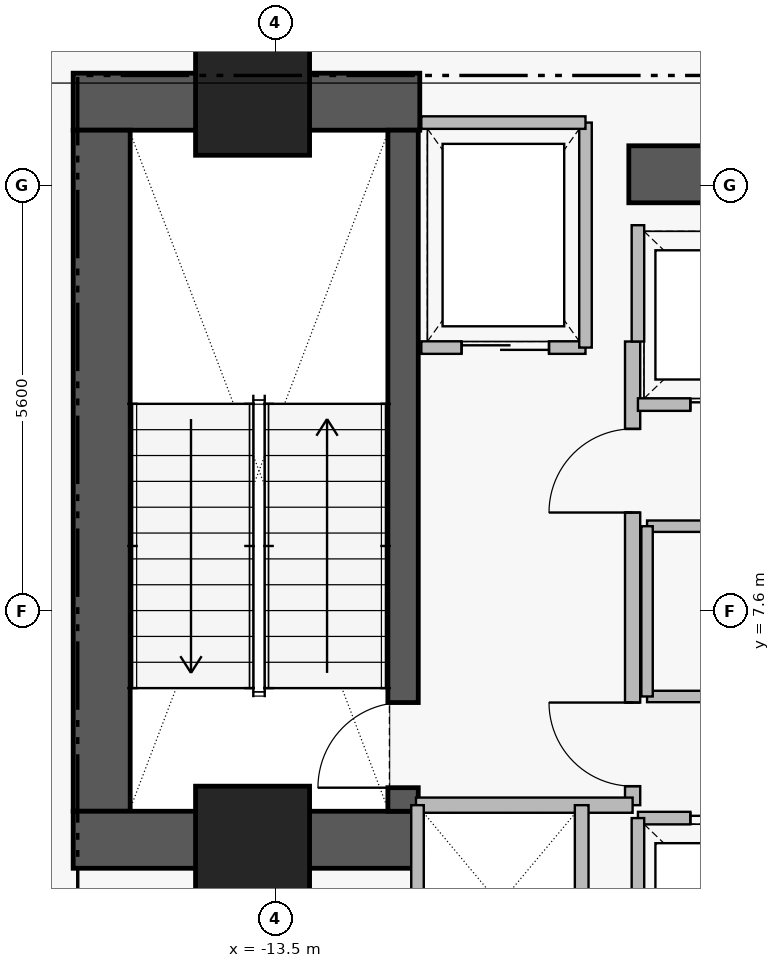
"""IFC4 building model, lengths in metres.
Left out: names, types, materials, properties, quantities, classifications, styles, units other than length and angle.
Written with IfcOpenShell. Run it as: python <this file> out.ifc"""

import sys

from ifc_helpers import new_model, si_unit, direction, frame, frame_2d, origin, origin_2d, place, context, subcontext, project, spatial, rectangle, extrude, element, fill, save


model = new_model("IFC4")
c1 = context("Model", 3, precision=1e-05, world=origin(), true_north=direction((0.0, 1.0)))
c2 = subcontext(c1, "Body", "Model", "MODEL_VIEW")
j1 = project(units=[si_unit("LENGTHUNIT", "METRE"), si_unit("PLANEANGLEUNIT", "RADIAN")], contexts=[c1])
p1 = place(None, origin())
s1 = spatial("IfcSite", under=j1, at=p1, CompositionType="ELEMENT")
p2 = place(p1, origin())
s2 = spatial("IfcBuilding", under=s1, at=p2, CompositionType="ELEMENT")
p3 = place(p2, frame((0.0, 0.0, 154.05)))
s3 = spatial("IfcBuildingStorey", under=s2, at=p3, CompositionType="ELEMENT", Elevation=154.05)
p4 = place(p3, frame((-16.16, 14.305, 0.0), z_axis=(0.0, 0.0, 1.0), x_axis=(1.0, 0.0, 0.0)))
e1 = element("IfcWall", 1, at=p4, inside=s3, PredefinedType="SHEAR", context=c2, shape_type="SweptSolid", body=[
    extrude(rectangle(XDim=4.56, YDim=0.75, at=frame_2d((2.28, 0.0))), origin(), (0.0, 0.0, 1.0), 4.31),
])
p5 = place(p3, frame((-15.785, 4.97, 0.0), z_axis=(0.0, 0.0, 1.0), x_axis=(0.0, 1.0, 0.0)))
e2 = element("IfcWall", 2, at=p5, inside=s3, PredefinedType="SHEAR", context=c2, shape_type="SweptSolid", body=[
    extrude(rectangle(XDim=8.96, YDim=0.75, at=frame_2d((4.48, 0.0))), origin(), (0.0, 0.0, 1.0), 4.31),
])
p6 = place(p3, frame((-16.16, 4.595, 0.0), z_axis=(0.0, 0.0, 1.0), x_axis=(1.0, 0.0, 0.0)))
e3 = element("IfcWall", 3, at=p6, inside=s3, PredefinedType="SHEAR", context=c2, shape_type="SweptSolid", body=[
    extrude(rectangle(XDim=4.56, YDim=0.75, at=frame_2d((2.28, 0.0))), origin(), (0.0, 0.0, 1.0), 4.31),
])
p7 = place(p3, frame((-8.85, 13.35, 0.0), z_axis=(0.0, 0.0, 1.0), x_axis=(1.0, 0.0, 0.0)))
e4 = element("IfcWall", 4, at=p7, inside=s3, PredefinedType="SHEAR", context=c2, shape_type="SweptSolid", body=[
    extrude(rectangle(XDim=7.6, YDim=0.75, at=frame_2d((3.8, 0.0))), origin(), (0.0, 0.0, 1.0), 4.28),
])
p8 = place(p3, frame((-11.82, 4.97, 0.0), z_axis=(0.0, 0.0, 1.0), x_axis=(0.0, 1.0, 0.0)))
e5 = element("IfcWall", 5, at=p8, inside=s3, PredefinedType="SHEAR", context=c2, shape_type="SweptSolid", body=[
    extrude(rectangle(XDim=8.96, YDim=0.4, at=frame_2d((4.48, 0.0))), origin(), (0.0, 0.0, 1.0), 4.31),
])
p9 = place(p8, frame((0.31, 0.0, 0.0)))
e6 = element("IfcOpeningElement", 6, at=p9, cuts=e5, PredefinedType="OPENING", context=c2, shape_type="SweptSolid", body=[
    extrude(rectangle(XDim=1.12, YDim=2.22, at=frame_2d((0.56, 1.11))), frame((0.0, 0.21, 0.0), z_axis=(0.0, -1.0, 0.0), x_axis=(1.0, 0.0, 0.0)), (0.0, 0.0, 1.0), 0.42),
])
for number, where, z_axis, x_axis in (
    (7, (-13.8, 14.35, 0.0), (0.0, 0.0, 1.0), (1.0, 0.0, 0.0)),
    (8, (-13.8, 4.55, 0.0), (0.0, 0.0, 1.0), (1.0, 0.0, 0.0)),
):
    element("IfcColumn", number, at=place(p3, frame(where, z_axis=z_axis, x_axis=x_axis)), inside=s3, PredefinedType="COLUMN", context=c2, shape_type="SweptSolid", body=[
        extrude(rectangle(XDim=1.5, YDim=1.5, at=origin_2d()), origin(), (0.0, 0.0, 1.0), 4.5),
    ])
p10 = place(p3, frame((-8.8, 5.05, 0.0), z_axis=(0.0, 0.0, 1.0), x_axis=(0.0, 1.0, 0.0)))
e9 = element("IfcWall", 9, at=p10, inside=s3, PredefinedType="PARTITIONING", context=c2, shape_type="SweptSolid", body=[
    extrude(rectangle(XDim=6.1, YDim=0.2, at=frame_2d((3.05, 0.0))), origin(), (0.0, 0.0, 1.0), 4.28),
])
p11 = place(p10, frame((0.25, 0.0, 0.0)))
e10 = element("IfcOpeningElement", 10, at=p11, cuts=e9, PredefinedType="OPENING", context=c2, shape_type="SweptSolid", body=[
    extrude(rectangle(XDim=1.1, YDim=2.2, at=frame_2d((0.55, 1.1))), frame((0.0, 0.11, 0.0), z_axis=(0.0, -1.0, 0.0), x_axis=(1.0, 0.0, 0.0)), (0.0, 0.0, 1.0), 0.22),
])
p12 = place(p10, frame((3.85, 0.0, 0.0)))
e11 = element("IfcOpeningElement", 11, at=p12, cuts=e9, PredefinedType="OPENING", context=c2, shape_type="SweptSolid", body=[
    extrude(rectangle(XDim=1.1, YDim=2.2, at=frame_2d((0.55, 1.1))), frame((0.0, 0.11, 0.0), z_axis=(0.0, -1.0, 0.0), x_axis=(1.0, 0.0, 0.0)), (0.0, 0.0, 1.0), 0.22),
])
p13 = place(p3, frame((-11.58, 11.07, 0.0), z_axis=(0.0, 0.0, 1.0), x_axis=(1.0, 0.0, 0.0)))
e12 = element("IfcWall", 12, at=p13, inside=s3, PredefinedType="PARTITIONING", context=c2, shape_type="SweptSolid", body=[
    extrude(rectangle(XDim=2.16, YDim=0.165, at=frame_2d((1.08, 0.0))), origin(), (0.0, 0.0, 1.0), 4.28),
])
p14 = place(p13, frame((0.53, 0.0, 0.0)))
e13 = element("IfcOpeningElement", 13, at=p14, cuts=e12, PredefinedType="OPENING", context=c2, shape_type="SweptSolid", body=[
    extrude(rectangle(XDim=1.15, YDim=2.25, at=frame_2d((0.575, 1.125))), frame((0.0, 0.093, 0.0), z_axis=(0.0, -1.0, 0.0), x_axis=(1.0, 0.0, 0.0)), (0.0, 0.0, 1.0), 0.185),
])
p15 = place(p3, frame((-8.73, 4.88, 0.0), z_axis=(0.0, 0.0, 1.0), x_axis=(1.0, 0.0, 0.0)))
e14 = element("IfcWall", 14, at=p15, inside=s3, PredefinedType="PARTITIONING", context=c2, shape_type="SweptSolid", body=[
    extrude(rectangle(XDim=2.48, YDim=0.165, at=frame_2d((1.24, 0.0))), origin(), (0.0, 0.0, 1.0), 4.28),
])
p16 = place(p15, frame((0.69, 0.0, 0.0)))
e15 = element("IfcOpeningElement", 15, at=p16, cuts=e14, PredefinedType="OPENING", context=c2, shape_type="SweptSolid", body=[
    extrude(rectangle(XDim=1.1, YDim=2.25, at=frame_2d((0.55, 1.125))), frame((0.0, 0.093, 0.0), z_axis=(0.0, -1.0, 0.0), x_axis=(1.0, 0.0, 0.0)), (0.0, 0.0, 1.0), 0.185),
])
p17 = place(p3, frame((-8.73, 10.32, 0.0), z_axis=(0.0, 0.0, 1.0), x_axis=(1.0, 0.0, 0.0)))
e16 = element("IfcWall", 16, at=p17, inside=s3, PredefinedType="PARTITIONING", context=c2, shape_type="SweptSolid", body=[
    extrude(rectangle(XDim=2.48, YDim=0.165, at=frame_2d((1.24, 0.0))), origin(), (0.0, 0.0, 1.0), 4.28),
])
p18 = place(p17, frame((0.69, 0.0, 0.0)))
e17 = element("IfcOpeningElement", 17, at=p18, cuts=e16, PredefinedType="OPENING", context=c2, shape_type="SweptSolid", body=[
    extrude(rectangle(XDim=1.1, YDim=2.25, at=frame_2d((0.55, 1.125))), frame((0.0, 0.093, 0.0), z_axis=(0.0, -1.0, 0.0), x_axis=(1.0, 0.0, 0.0)), (0.0, 0.0, 1.0), 0.185),
])
p19 = place(p3, frame((-8.61, 6.48, 0.0), z_axis=(0.0, 0.0, 1.0), x_axis=(1.0, 0.0, 0.0)))
e18 = element("IfcWall", 18, at=p19, inside=s3, PredefinedType="PARTITIONING", context=c2, shape_type="SweptSolid", body=[
    extrude(rectangle(XDim=3.62, YDim=0.15, at=frame_2d((1.81, 0.0))), origin(), (0.0, 0.0, 1.0), 4.28),
])
p20 = place(p19, frame((1.36, 0.0, 0.0)))
e19 = element("IfcOpeningElement", 19, at=p20, cuts=e18, PredefinedType="OPENING", context=c2, shape_type="SweptSolid", body=[
    extrude(rectangle(XDim=0.9, YDim=2.15, at=frame_2d((0.45, 1.075))), frame((0.0, 0.085, 0.0), z_axis=(0.0, -1.0, 0.0), x_axis=(1.0, 0.0, 0.0)), (0.0, 0.0, 1.0), 0.17),
])
p21 = place(p3, frame((-11.65, 5.05, 0.0), z_axis=(0.0, 0.0, 1.0), x_axis=(1.0, 0.0, 0.0)))
e20 = element("IfcWall", 20, at=p21, inside=s3, PredefinedType="PARTITIONING", context=c2, shape_type="SweptSolid", body=[
    extrude(rectangle(XDim=2.85, YDim=0.2, at=frame_2d((1.425, 0.0))), origin(), (0.0, 0.0, 1.0), 4.28),
])
p22 = place(p3, frame((-9.42, 11.07, 0.0), z_axis=(0.0, 0.0, 1.0), x_axis=(0.0, 1.0, 0.0)))
e21 = element("IfcWall", 21, at=p22, inside=s3, PredefinedType="PARTITIONING", context=c2, shape_type="SweptSolid", body=[
    extrude(rectangle(XDim=2.96, YDim=0.165, at=frame_2d((1.48, 0.0))), origin(), (0.0, 0.0, 1.0), 4.28),
])
p23 = place(p3, frame((-11.58, 14.03, 0.0), z_axis=(0.0, 0.0, 1.0), x_axis=(1.0, 0.0, 0.0)))
e22 = element("IfcWall", 22, at=p23, inside=s3, PredefinedType="PARTITIONING", context=c2, shape_type="SweptSolid", body=[
    extrude(rectangle(XDim=2.16, YDim=0.165, at=frame_2d((1.08, 0.0))), origin(), (0.0, 0.0, 1.0), 4.28),
])
p24 = place(p3, frame((-8.73, 2.52, 0.0), z_axis=(0.0, 0.0, 1.0), x_axis=(0.0, 1.0, 0.0)))
e23 = element("IfcWall", 23, at=p24, inside=s3, PredefinedType="PARTITIONING", context=c2, shape_type="SweptSolid", body=[
    extrude(rectangle(XDim=2.36, YDim=0.165, at=frame_2d((1.18, 0.0))), origin(), (0.0, 0.0, 1.0), 4.28),
])
p25 = place(p3, frame((-8.73, 11.15, 0.0), z_axis=(0.0, 0.0, 1.0), x_axis=(0.0, 1.0, 0.0)))
e24 = element("IfcWall", 24, at=p25, inside=s3, PredefinedType="PARTITIONING", context=c2, shape_type="SweptSolid", body=[
    extrude(rectangle(XDim=1.53, YDim=0.165, at=frame_2d((0.765, 0.0))), origin(), (0.0, 0.0, 1.0), 4.28),
])
p26 = place(p3, frame((-9.47, 2.45, 0.0), z_axis=(0.0, 0.0, 1.0), x_axis=(0.0, 1.0, 0.0)))
e25 = element("IfcWall", 25, at=p26, inside=s3, PredefinedType="PARTITIONING", context=c2, shape_type="SweptSolid", body=[
    extrude(rectangle(XDim=2.6, YDim=0.18, at=frame_2d((1.3, 0.0))), origin(), (0.0, 0.0, 1.0), 4.28),
])
p27 = place(p3, frame((-11.63, 2.47, 0.0), z_axis=(0.0, 0.0, 1.0), x_axis=(0.0, 1.0, 0.0)))
e26 = element("IfcWall", 26, at=p27, inside=s3, PredefinedType="PARTITIONING", context=c2, shape_type="SweptSolid", body=[
    extrude(rectangle(XDim=2.58, YDim=0.165, at=frame_2d((1.29, 0.0))), origin(), (0.0, 0.0, 1.0), 4.28),
])
p28 = place(p3, frame((-8.61, 8.72, 0.0), z_axis=(0.0, 0.0, 1.0), x_axis=(1.0, 0.0, 0.0)))
e27 = element("IfcWall", 27, at=p28, inside=s3, PredefinedType="PARTITIONING", context=c2, shape_type="SweptSolid", body=[
    extrude(rectangle(XDim=3.62, YDim=0.15, at=frame_2d((1.81, 0.0))), origin(), (0.0, 0.0, 1.0), 4.28),
])
p29 = place(p3, frame((-8.61, 6.48, 0.0), z_axis=(0.0, 0.0, 1.0), x_axis=(0.0, 1.0, 0.0)))
e28 = element("IfcWall", 28, at=p29, inside=s3, PredefinedType="PARTITIONING", context=c2, shape_type="SweptSolid", body=[
    extrude(rectangle(XDim=2.24, YDim=0.15, at=frame_2d((1.12, 0.0))), origin(), (0.0, 0.0, 1.0), 4.28),
])
p30 = place(p9, origin())
e29 = element("IfcDoor", 29, at=p30, inside=s3, OperationType="SINGLE_SWING_LEFT", PredefinedType="DOOR", context=c2, shape_type="SweptSolid", body=[
    extrude(rectangle(XDim=1.12, YDim=2.22, at=frame_2d((0.56, 1.11))), frame((0.0, 0.025, 0.0), z_axis=(0.0, -1.0, 0.0), x_axis=(1.0, 0.0, 0.0)), (0.0, 0.0, 1.0), 0.05),
])
fill(e6, e29)
p31 = place(p11, origin())
e30 = element("IfcDoor", 30, at=p31, inside=s3, OperationType="SINGLE_SWING_RIGHT", PredefinedType="DOOR", context=c2, shape_type="SweptSolid", body=[
    extrude(rectangle(XDim=1.1, YDim=2.2, at=frame_2d((0.55, 1.1))), frame((0.0, 0.025, 0.0), z_axis=(0.0, -1.0, 0.0), x_axis=(1.0, 0.0, 0.0)), (0.0, 0.0, 1.0), 0.05),
])
fill(e10, e30)
p32 = place(p12, origin())
e31 = element("IfcDoor", 31, at=p32, inside=s3, OperationType="SINGLE_SWING_LEFT", PredefinedType="DOOR", context=c2, shape_type="SweptSolid", body=[
    extrude(rectangle(XDim=1.1, YDim=2.2, at=frame_2d((0.55, 1.1))), frame((0.0, 0.025, 0.0), z_axis=(0.0, -1.0, 0.0), x_axis=(1.0, 0.0, 0.0)), (0.0, 0.0, 1.0), 0.05),
])
fill(e11, e31)
p33 = place(p14, origin())
e32 = element("IfcDoor", 32, at=p33, inside=s3, OperationType="SLIDING_TO_LEFT", PredefinedType="DOOR", context=c2, shape_type="SweptSolid", body=[
    extrude(rectangle(XDim=1.15, YDim=2.25, at=frame_2d((0.575, 1.125))), frame((0.0, 0.025, 0.0), z_axis=(0.0, -1.0, 0.0), x_axis=(1.0, 0.0, 0.0)), (0.0, 0.0, 1.0), 0.05),
])
fill(e13, e32)
p34 = place(p16, origin())
e33 = element("IfcDoor", 33, at=p34, inside=s3, OperationType="SLIDING_TO_LEFT", PredefinedType="DOOR", context=c2, shape_type="SweptSolid", body=[
    extrude(rectangle(XDim=1.1, YDim=2.25, at=frame_2d((0.55, 1.125))), frame((0.0, 0.025, 0.0), z_axis=(0.0, -1.0, 0.0), x_axis=(1.0, 0.0, 0.0)), (0.0, 0.0, 1.0), 0.05),
])
fill(e15, e33)
p35 = place(p18, origin())
e34 = element("IfcDoor", 34, at=p35, inside=s3, OperationType="SLIDING_TO_LEFT", PredefinedType="DOOR", context=c2, shape_type="SweptSolid", body=[
    extrude(rectangle(XDim=1.1, YDim=2.25, at=frame_2d((0.55, 1.125))), frame((0.0, 0.025, 0.0), z_axis=(0.0, -1.0, 0.0), x_axis=(1.0, 0.0, 0.0)), (0.0, 0.0, 1.0), 0.05),
])
fill(e17, e34)
save(model, sys.argv[1])
